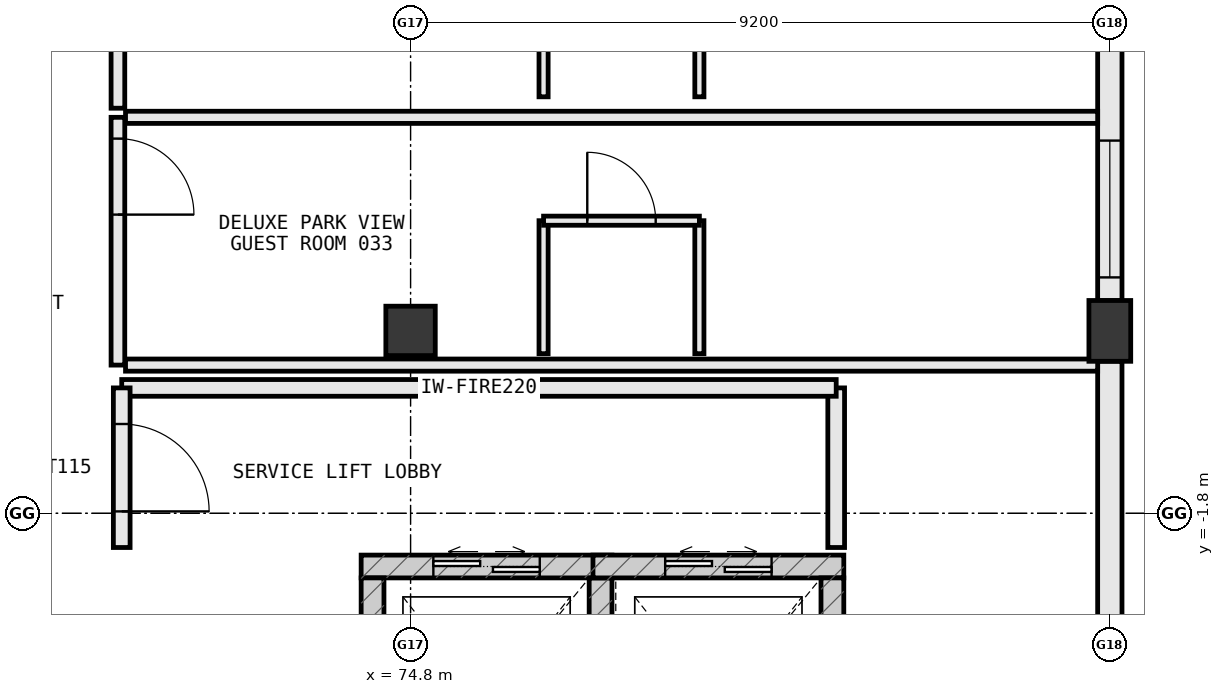
"""IFC4 building model, lengths in metres.
Left out: names, types, materials, properties, quantities, classifications, styles, units other than length and angle.
Written with IfcOpenShell. Run it as: python <this file> out.ifc"""

import sys

from ifc_helpers import new_model, si_unit, direction, frame, frame_2d, origin, origin_2d, place, context, subcontext, project, spatial, rectangle, extrude, element, fill, save


model = new_model("IFC4")
c1 = context("Model", 3, precision=1e-05, world=origin(), true_north=direction((0.0, 1.0)))
c2 = subcontext(c1, "Body", "Model", "MODEL_VIEW")
j1 = project(units=[si_unit("LENGTHUNIT", "METRE"), si_unit("PLANEANGLEUNIT", "RADIAN")], contexts=[c1])
p1 = place(None, origin())
s1 = spatial("IfcSite", under=j1, at=p1, CompositionType="ELEMENT")
p2 = place(p1, origin())
s2 = spatial("IfcBuilding", under=s1, at=p2, CompositionType="ELEMENT")
p3 = place(p2, frame((0.0, 0.0, 10.8)))
s3 = spatial("IfcBuildingStorey", under=s2, at=p3, CompositionType="ELEMENT", Elevation=10.8)
p4 = place(p3, frame((74.8, 0.6, 0.0), z_axis=(0.0, 0.0, 1.0), x_axis=(1.0, 0.0, 0.0)))
e1 = element("IfcColumn", 1, at=p4, inside=s3, PredefinedType="COLUMN", context=c2, shape_type="SweptSolid", body=[
    extrude(rectangle(XDim=0.65, YDim=0.65, at=origin_2d()), origin(), (0.0, 0.0, 1.0), 5.4),
])
p5 = place(p3, frame((84.0, 0.6, 0.0), z_axis=(0.0, 0.0, 1.0), x_axis=(1.0, 0.0, 0.0)))
e2 = element("IfcColumn", 2, at=p5, inside=s3, PredefinedType="PILASTER", context=c2, shape_type="SweptSolid", body=[
    extrude(rectangle(XDim=0.55, YDim=0.8, at=origin_2d()), origin(), (0.0, 0.0, 1.0), 5.4),
])
p6 = place(p3, frame((84.0, -8.602, 0.0), z_axis=(0.0, 0.0, 1.0), x_axis=(0.0, 1.0, 0.0)))
e3 = element("IfcWall", 3, at=p6, inside=s3, PredefinedType="STANDARD", context=c2, shape_type="SweptSolid", body=[
    extrude(rectangle(XDim=8.804, YDim=0.32, at=frame_2d((4.402, 0.0))), origin(), (0.0, 0.0, 1.0), 4.332),
])
p7 = place(p3, frame((84.0, 0.998, 0.0), z_axis=(0.0, 0.0, 1.0), x_axis=(0.0, 1.0, 0.0)))
e4 = element("IfcWall", 4, at=p7, inside=s3, PredefinedType="STANDARD", context=c2, shape_type="SweptSolid", body=[
    extrude(rectangle(XDim=8.804, YDim=0.32, at=frame_2d((4.402, 0.0))), origin(), (0.0, 0.0, 1.0), 4.332),
])
p8 = place(p7, frame((3.427, 0.0, 0.85)))
e5 = element("IfcOpeningElement", 5, at=p8, cuts=e4, PredefinedType="OPENING", context=c2, shape_type="SweptSolid", body=[
    extrude(rectangle(XDim=1.95, YDim=1.9, at=frame_2d((0.975, 0.95))), frame((0.0, 0.172, 0.0), z_axis=(0.0, -1.0, 0.0), x_axis=(1.0, 0.0, 0.0)), (0.0, 0.0, 1.0), 0.344),
])
p9 = place(p7, frame((0.306, 0.0, 0.85)))
e6 = element("IfcOpeningElement", 6, at=p9, cuts=e4, PredefinedType="OPENING", context=c2, shape_type="SweptSolid", body=[
    extrude(rectangle(XDim=1.8, YDim=1.85, at=frame_2d((0.9, 0.925))), frame((0.0, 0.172, 0.0), z_axis=(0.0, -1.0, 0.0), x_axis=(1.0, 0.0, 0.0)), (0.0, 0.0, 1.0), 0.344),
])
p10 = place(p7, frame((6.458, 0.0, 0.85)))
e7 = element("IfcOpeningElement", 7, at=p10, cuts=e4, PredefinedType="OPENING", context=c2, shape_type="SweptSolid", body=[
    extrude(rectangle(XDim=1.8, YDim=1.85, at=frame_2d((0.9, 0.925))), frame((0.0, 0.172, 0.0), z_axis=(0.0, -1.0, 0.0), x_axis=(1.0, 0.0, 0.0)), (0.0, 0.0, 1.0), 0.344),
])
p11 = place(p3, frame((77.45, -2.5, 0.0), z_axis=(0.0, 0.0, 1.0), x_axis=(-1.0, 0.0, 0.0)))
e8 = element("IfcWall", 8, at=p11, inside=s3, PredefinedType="SHEAR", context=c2, shape_type="SweptSolid", body=[
    extrude(rectangle(XDim=3.3, YDim=0.3, at=frame_2d((1.65, 0.0))), origin(), (0.0, 0.0, 1.0), 5.4),
])
p12 = place(p11, frame((0.95, 0.0, 0.0)))
e9 = element("IfcOpeningElement", 9, at=p12, cuts=e8, PredefinedType="OPENING", context=c2, shape_type="SweptSolid", body=[
    extrude(rectangle(XDim=1.4, YDim=2.2, at=frame_2d((0.7, 1.1))), frame((0.0, 0.162, 0.0), z_axis=(0.0, -1.0, 0.0), x_axis=(1.0, 0.0, 0.0)), (0.0, 0.0, 1.0), 0.324),
])
for number, where, z_axis, x_axis in (
    (10, (77.3, -5.95, 0.0), (0.0, 0.0, 1.0), (0.0, 1.0, 0.0)),
    (11, (74.3, -2.65, 0.0), (0.0, 0.0, 1.0), (0.0, -1.0, 0.0)),
):
    element("IfcWall", number, at=place(p3, frame(where, z_axis=z_axis, x_axis=x_axis)), inside=s3, PredefinedType="SHEAR", context=c2, shape_type="SweptSolid", body=[
        extrude(rectangle(XDim=3.3, YDim=0.3, at=frame_2d((1.65, 0.0))), origin(), (0.0, 0.0, 1.0), 5.4),
    ])
p13 = place(p3, frame((80.5, -2.5, 0.0), z_axis=(0.0, 0.0, 1.0), x_axis=(-1.0, 0.0, 0.0)))
e12 = element("IfcWall", 12, at=p13, inside=s3, PredefinedType="SHEAR", context=c2, shape_type="SweptSolid", body=[
    extrude(rectangle(XDim=3.3, YDim=0.3, at=frame_2d((1.65, 0.0))), origin(), (0.0, 0.0, 1.0), 5.4),
])
p14 = place(p13, frame((0.95, 0.0, 0.0)))
e13 = element("IfcOpeningElement", 13, at=p14, cuts=e12, PredefinedType="OPENING", context=c2, shape_type="SweptSolid", body=[
    extrude(rectangle(XDim=1.4, YDim=2.2, at=frame_2d((0.7, 1.1))), frame((0.0, 0.162, 0.0), z_axis=(0.0, -1.0, 0.0), x_axis=(1.0, 0.0, 0.0)), (0.0, 0.0, 1.0), 0.324),
])
p15 = place(p3, frame((80.35, -5.95, 0.0), z_axis=(0.0, 0.0, 1.0), x_axis=(0.0, 1.0, 0.0)))
e14 = element("IfcWall", 14, at=p15, inside=s3, PredefinedType="SHEAR", context=c2, shape_type="SweptSolid", body=[
    extrude(rectangle(XDim=3.3, YDim=0.3, at=frame_2d((1.65, 0.0))), origin(), (0.0, 0.0, 1.0), 5.4),
])
p16 = place(p3, frame((80.4, -2.25, 0.0), z_axis=(0.0, 0.0, 1.0), x_axis=(0.0, 1.0, 0.0)))
e15 = element("IfcWall", 15, at=p16, inside=s3, PredefinedType="STANDARD", context=c2, shape_type="SweptSolid", body=[
    extrude(rectangle(XDim=2.1, YDim=0.22, at=frame_2d((1.05, 0.0))), origin(), (0.0, 0.0, 1.0), 4.8),
])
p17 = place(p3, frame((80.4, -0.15, 0.0), z_axis=(0.0, 0.0, 1.0), x_axis=(-1.0, 0.0, 0.0)))
e16 = element("IfcWall", 16, at=p17, inside=s3, PredefinedType="STANDARD", context=c2, shape_type="SweptSolid", body=[
    extrude(rectangle(XDim=9.4, YDim=0.22, at=frame_2d((4.7, 0.0))), origin(), (0.0, 0.0, 1.0), 4.8),
])
p18 = place(p3, frame((71.0, -0.15, 0.0), z_axis=(0.0, 0.0, 1.0), x_axis=(0.0, -1.0, 0.0)))
e17 = element("IfcWall", 17, at=p18, inside=s3, PredefinedType="STANDARD", context=c2, shape_type="SweptSolid", body=[
    extrude(rectangle(XDim=2.1, YDim=0.22, at=frame_2d((1.05, 0.0))), origin(), (0.0, 0.0, 1.0), 4.8),
])
p19 = place(p18, frame((0.475, 0.0, 0.0)))
e18 = element("IfcOpeningElement", 18, at=p19, cuts=e17, PredefinedType="OPENING", context=c2, shape_type="SweptSolid", body=[
    extrude(rectangle(XDim=1.15, YDim=2.2, at=frame_2d((0.575, 1.1))), frame((0.0, 0.122, 0.0), z_axis=(0.0, -1.0, 0.0), x_axis=(1.0, 0.0, 0.0)), (0.0, 0.0, 1.0), 0.244),
])
p20 = place(p3, frame((70.95, 3.41, 0.0), z_axis=(0.0, 0.0, 1.0), x_axis=(0.0, -1.0, 0.0)))
e19 = element("IfcWall", 19, at=p20, inside=s3, PredefinedType="PARTITIONING", context=c2, shape_type="SweptSolid", body=[
    extrude(rectangle(XDim=3.26, YDim=0.18, at=frame_2d((1.63, 0.0))), origin(), (0.0, 0.0, 1.0), 4.8),
])
p21 = place(p20, frame((0.28, 0.0, 0.0)))
e20 = element("IfcOpeningElement", 20, at=p21, cuts=e19, PredefinedType="OPENING", context=c2, shape_type="SweptSolid", body=[
    extrude(rectangle(XDim=1.0, YDim=2.2, at=frame_2d((0.5, 1.1))), frame((0.0, 0.102, 0.0), z_axis=(0.0, -1.0, 0.0), x_axis=(1.0, 0.0, 0.0)), (0.0, 0.0, 1.0), 0.204),
])
for number, where, z_axis, x_axis in (
    (21, (71.05, 0.15, 0.0), (0.0, 0.0, 1.0), (1.0, 0.0, 0.0)),
    (22, (71.05, 3.41, 0.0), (0.0, 0.0, 1.0), (1.0, 0.0, 0.0)),
):
    element("IfcWall", number, at=place(p3, frame(where, z_axis=z_axis, x_axis=x_axis)), inside=s3, PredefinedType="PARTITIONING", context=c2, shape_type="SweptSolid", body=[
        extrude(rectangle(XDim=12.79, YDim=0.16, at=frame_2d((6.395, 0.0))), origin(), (0.0, 0.0, 1.0), 4.8),
    ])
for number, where, z_axis, x_axis in (
    (23, (76.55, 0.3, 0.0), (0.0, 0.0, 1.0), (0.0, 1.0, 0.0)),
    (24, (78.6, 0.3, 0.0), (0.0, 0.0, 1.0), (0.0, 1.0, 0.0)),
):
    element("IfcWall", number, at=place(p3, frame(where, z_axis=z_axis, x_axis=x_axis)), inside=s3, PredefinedType="PARTITIONING", context=c2, shape_type="SweptSolid", body=[
        extrude(rectangle(XDim=1.75, YDim=0.12, at=frame_2d((0.875, 0.0))), origin(), (0.0, 0.0, 1.0), 4.8),
    ])
p22 = place(p3, frame((76.55, 2.05, 0.0), z_axis=(0.0, 0.0, 1.0), x_axis=(1.0, 0.0, 0.0)))
e25 = element("IfcWall", 25, at=p22, inside=s3, PredefinedType="PARTITIONING", context=c2, shape_type="SweptSolid", body=[
    extrude(rectangle(XDim=2.05, YDim=0.12, at=frame_2d((1.025, 0.0))), origin(), (0.0, 0.0, 1.0), 4.8),
])
p23 = place(p22, frame((0.575, 0.0, 0.0)))
e26 = element("IfcOpeningElement", 26, at=p23, cuts=e25, PredefinedType="OPENING", context=c2, shape_type="SweptSolid", body=[
    extrude(rectangle(XDim=0.9, YDim=2.15, at=frame_2d((0.45, 1.075))), frame((0.0, 0.072, 0.0), z_axis=(0.0, -1.0, 0.0), x_axis=(1.0, 0.0, 0.0)), (0.0, 0.0, 1.0), 0.144),
])
p24 = place(p3, frame((70.95, 6.79, 0.0), z_axis=(0.0, 0.0, 1.0), x_axis=(0.0, -1.0, 0.0)))
e27 = element("IfcWall", 27, at=p24, inside=s3, PredefinedType="PARTITIONING", context=c2, shape_type="SweptSolid", body=[
    extrude(rectangle(XDim=3.26, YDim=0.18, at=frame_2d((1.63, 0.0))), origin(), (0.0, 0.0, 1.0), 4.8),
])
p25 = place(p24, frame((0.28, 0.0, 0.0)))
e28 = element("IfcOpeningElement", 28, at=p25, cuts=e27, PredefinedType="OPENING", context=c2, shape_type="SweptSolid", body=[
    extrude(rectangle(XDim=1.0, YDim=2.2, at=frame_2d((0.5, 1.1))), frame((0.0, 0.102, 0.0), z_axis=(0.0, -1.0, 0.0), x_axis=(1.0, 0.0, 0.0)), (0.0, 0.0, 1.0), 0.204),
])
for number, where, z_axis, x_axis in (
    (29, (76.55, 3.68, 0.0), (0.0, 0.0, 1.0), (0.0, 1.0, 0.0)),
    (30, (78.6, 3.68, 0.0), (0.0, 0.0, 1.0), (0.0, 1.0, 0.0)),
):
    element("IfcWall", number, at=place(p3, frame(where, z_axis=z_axis, x_axis=x_axis)), inside=s3, PredefinedType="PARTITIONING", context=c2, shape_type="SweptSolid", body=[
        extrude(rectangle(XDim=1.75, YDim=0.12, at=frame_2d((0.875, 0.0))), origin(), (0.0, 0.0, 1.0), 4.8),
    ])
p26 = place(p9, origin())
e31 = element("IfcWindow", 31, at=p26, inside=s3, PartitioningType="SINGLE_PANEL", PredefinedType="WINDOW", context=c2, shape_type="SweptSolid", body=[
    extrude(rectangle(XDim=1.8, YDim=1.85, at=frame_2d((0.9, 0.925))), frame((0.0, 0.03, 0.0), z_axis=(0.0, -1.0, 0.0), x_axis=(1.0, 0.0, 0.0)), (0.0, 0.0, 1.0), 0.06),
])
fill(e6, e31)
p27 = place(p12, origin())
e32 = element("IfcDoor", 32, at=p27, inside=s3, OperationType="DOUBLE_DOOR_SLIDING", PredefinedType="DOOR", context=c2, shape_type="SweptSolid", body=[
    extrude(rectangle(XDim=1.4, YDim=2.2, at=frame_2d((0.7, 1.1))), frame((0.0, 0.025, 0.0), z_axis=(0.0, -1.0, 0.0), x_axis=(1.0, 0.0, 0.0)), (0.0, 0.0, 1.0), 0.05),
])
fill(e9, e32)
p28 = place(p14, origin())
e33 = element("IfcDoor", 33, at=p28, inside=s3, OperationType="DOUBLE_DOOR_SLIDING", PredefinedType="DOOR", context=c2, shape_type="SweptSolid", body=[
    extrude(rectangle(XDim=1.4, YDim=2.2, at=frame_2d((0.7, 1.1))), frame((0.0, 0.025, 0.0), z_axis=(0.0, -1.0, 0.0), x_axis=(1.0, 0.0, 0.0)), (0.0, 0.0, 1.0), 0.05),
])
fill(e13, e33)
p29 = place(p19, origin())
e34 = element("IfcDoor", 34, at=p29, inside=s3, OperationType="SINGLE_SWING_RIGHT", PredefinedType="DOOR", context=c2, shape_type="SweptSolid", body=[
    extrude(rectangle(XDim=1.15, YDim=2.2, at=frame_2d((0.575, 1.1))), frame((0.0, 0.025, 0.0), z_axis=(0.0, -1.0, 0.0), x_axis=(1.0, 0.0, 0.0)), (0.0, 0.0, 1.0), 0.05),
])
fill(e18, e34)
p30 = place(p21, origin())
e35 = element("IfcDoor", 35, at=p30, inside=s3, OperationType="SINGLE_SWING_RIGHT", PredefinedType="DOOR", context=c2, shape_type="SweptSolid", body=[
    extrude(rectangle(XDim=1.0, YDim=2.2, at=frame_2d((0.5, 1.1))), frame((0.0, 0.025, 0.0), z_axis=(0.0, -1.0, 0.0), x_axis=(1.0, 0.0, 0.0)), (0.0, 0.0, 1.0), 0.05),
])
fill(e20, e35)
p31 = place(p23, origin())
e36 = element("IfcDoor", 36, at=p31, inside=s3, OperationType="SINGLE_SWING_LEFT", PredefinedType="DOOR", context=c2, shape_type="SweptSolid", body=[
    extrude(rectangle(XDim=0.9, YDim=2.15, at=frame_2d((0.45, 1.075))), frame((0.0, 0.025, 0.0), z_axis=(0.0, -1.0, 0.0), x_axis=(1.0, 0.0, 0.0)), (0.0, 0.0, 1.0), 0.05),
])
fill(e26, e36)
save(model, sys.argv[1])
